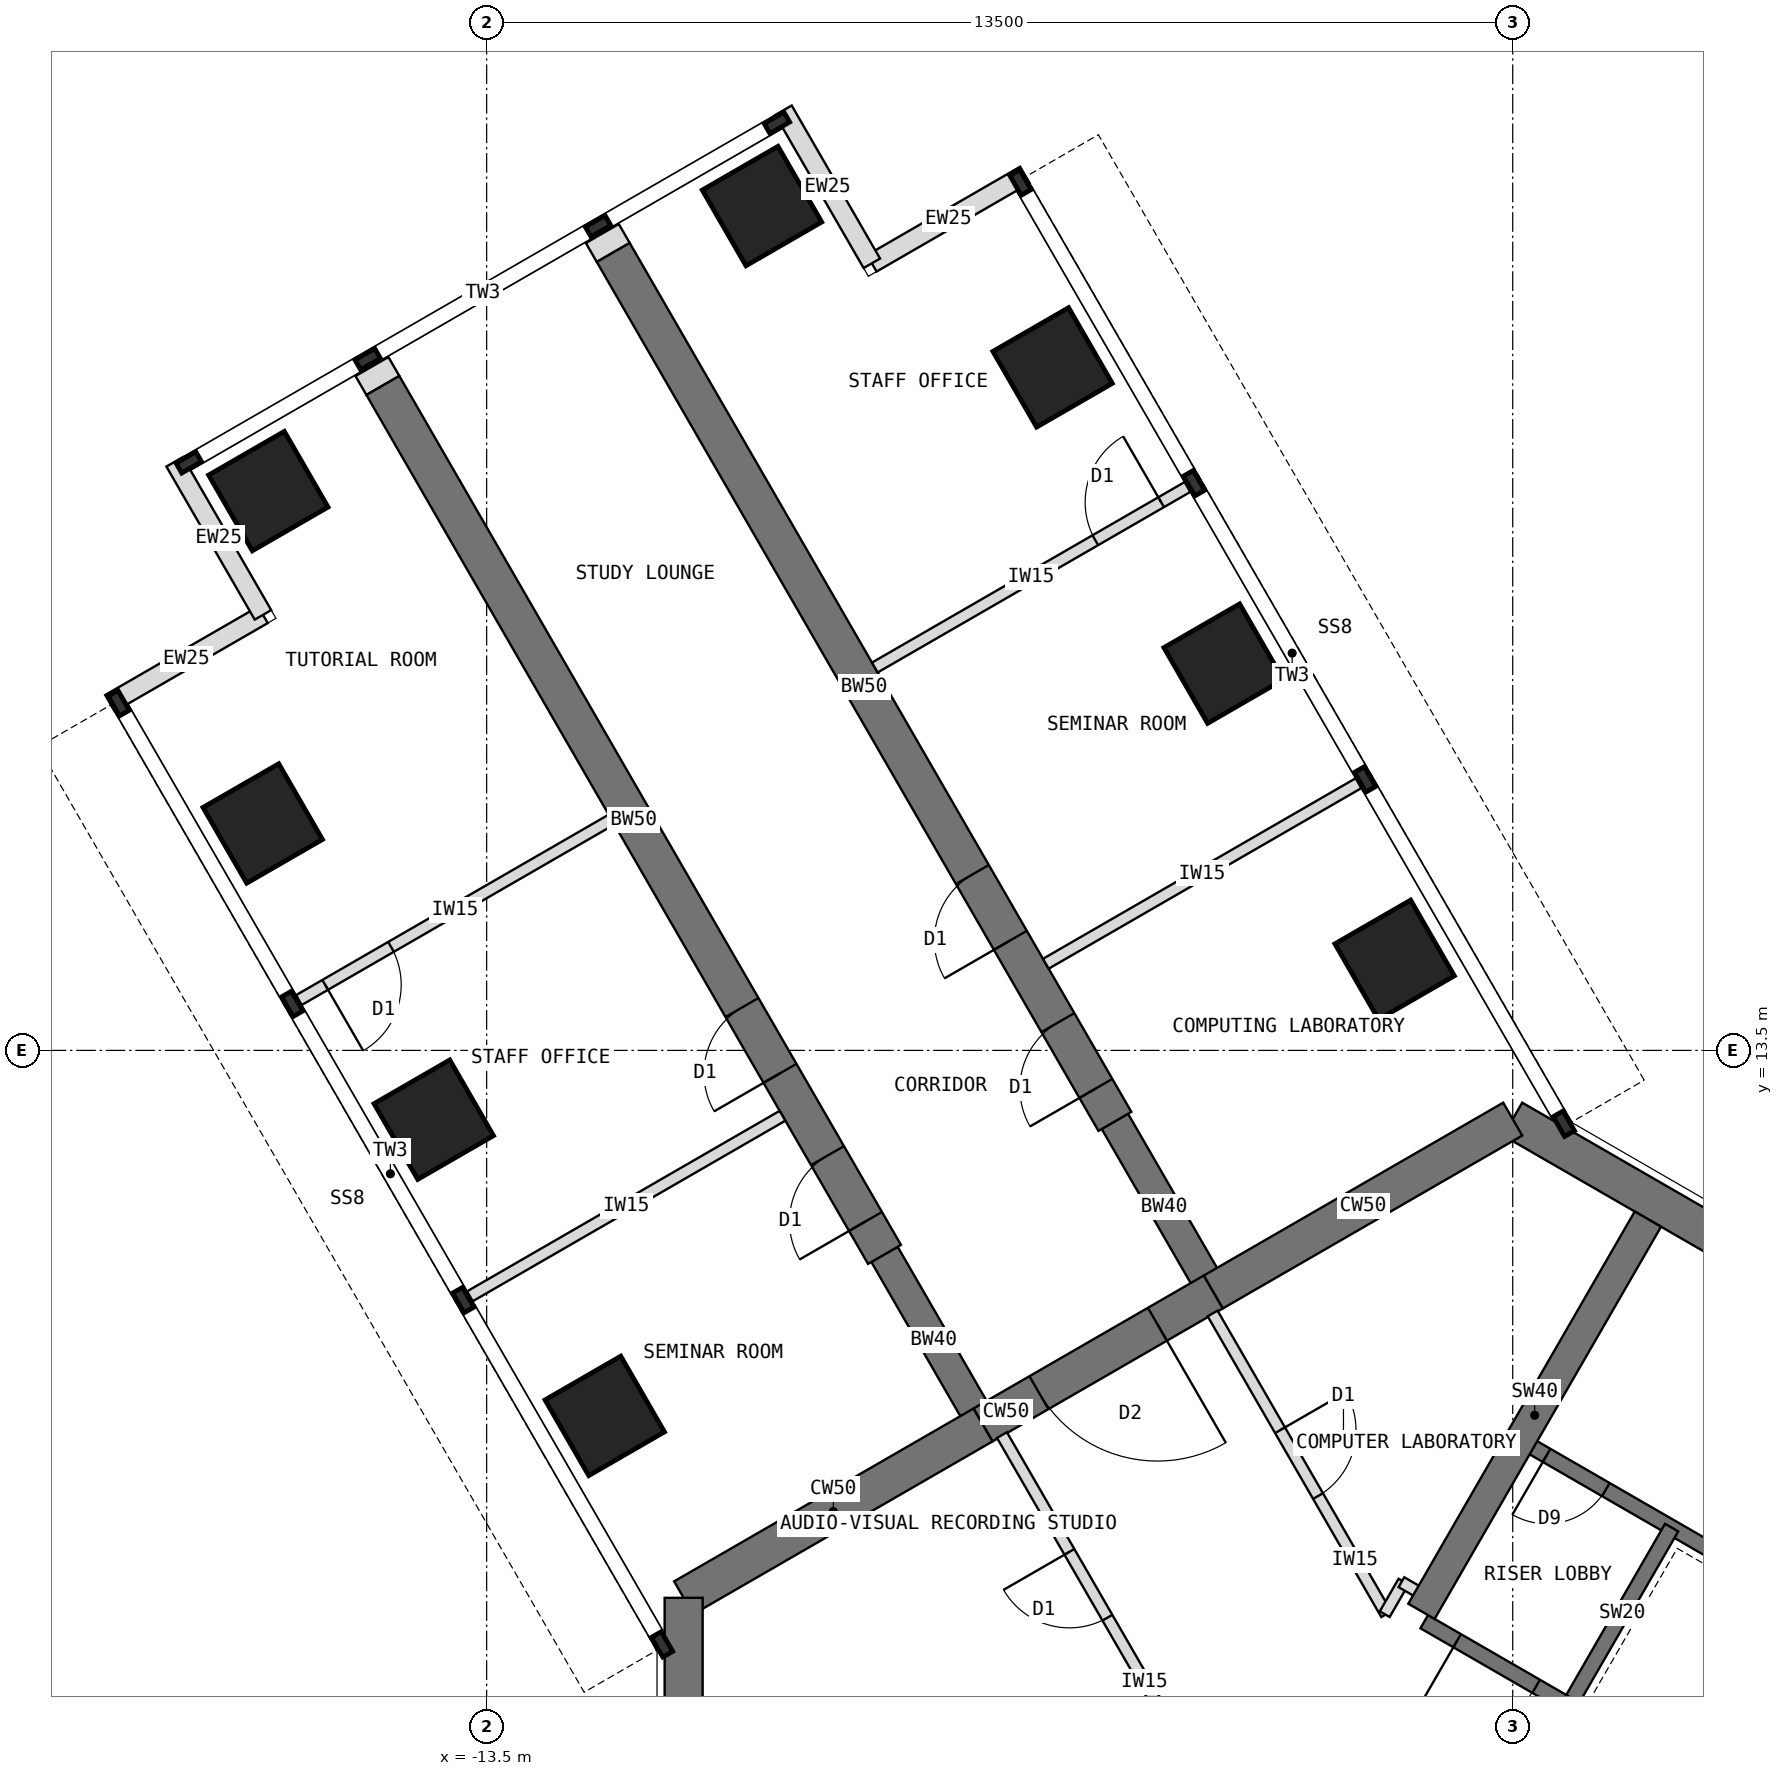
"""IFC4 building model, lengths in metres.
Left out: names, types, materials, properties, quantities, classifications, styles, units other than length and angle.
Written with IfcOpenShell. Run it as: python <this file> out.ifc"""

import sys

from ifc_helpers import new_model, si_unit, direction, frame, frame_2d, origin, origin_2d, place, context, subcontext, project, spatial, rectangle, extrude, element, fill, save


model = new_model("IFC4")
c1 = context("Model", 3, precision=1e-05, world=origin(), true_north=direction((0.0, 1.0)))
c2 = subcontext(c1, "Body", "Model", "MODEL_VIEW")
j1 = project(units=[si_unit("LENGTHUNIT", "METRE"), si_unit("PLANEANGLEUNIT", "RADIAN")], contexts=[c1])
p1 = place(None, origin())
s1 = spatial("IfcSite", under=j1, at=p1, CompositionType="ELEMENT")
p2 = place(p1, origin())
s2 = spatial("IfcBuilding", under=s1, at=p2, CompositionType="ELEMENT")
p3 = place(p2, frame((0.0, 0.0, 194.5)))
s3 = spatial("IfcBuildingStorey", under=s2, at=p3, CompositionType="ELEMENT", Elevation=194.5)
p4 = place(p3, frame((10.908, 6.298, 0.0), z_axis=(0.0, 0.0, 1.0), x_axis=(-0.866021940709, 0.500005998175, 0.0)))
e1 = element("IfcWall", 1, at=p4, inside=s3, PredefinedType="SHEAR", context=c2, shape_type="SweptSolid", body=[
    extrude(rectangle(XDim=12.596, YDim=0.5, at=frame_2d((6.298, 0.0))), origin(), (0.0, 0.0, 1.0), 4.0),
])
p5 = place(p3, frame((0.0, 12.596, 0.0), z_axis=(0.0, 0.0, 1.0), x_axis=(-0.866011268655, -0.500024481964, 0.0)))
e2 = element("IfcWall", 2, at=p5, inside=s3, PredefinedType="SHEAR", context=c2, shape_type="SweptSolid", body=[
    extrude(rectangle(XDim=4.548, YDim=0.5, at=frame_2d((2.274, 0.0))), origin(), (0.0, 0.0, 1.0), 4.0),
])
p6 = place(p3, frame((-3.939, 10.322, 0.0), z_axis=(0.0, 0.0, 1.0), x_axis=(-0.866019471182, -0.500010275428, 0.0)))
e3 = element("IfcWall", 3, at=p6, inside=s3, PredefinedType="SHEAR", context=c2, shape_type="SweptSolid", body=[
    extrude(rectangle(XDim=3.5, YDim=0.5, at=frame_2d((1.75, 0.0))), origin(), (0.0, 0.0, 1.0), 4.0),
])
p7 = place(p6, frame((0.85, 0.0, 0.0)))
e4 = element("IfcOpeningElement", 4, at=p7, cuts=e3, PredefinedType="OPENING", context=c2, shape_type="SweptSolid", body=[
    extrude(rectangle(XDim=1.8, YDim=2.1, at=frame_2d((0.9, 1.05))), frame((0.0, 0.26, 0.0), z_axis=(0.0, -1.0, 0.0), x_axis=(1.0, 0.0, 0.0)), (0.0, 0.0, 1.0), 0.52),
])
p8 = place(p3, frame((-6.97, 8.572, 0.0), z_axis=(0.0, 0.0, 1.0), x_axis=(-0.866034513004, -0.499984222037, 0.0)))
e5 = element("IfcWall", 5, at=p8, inside=s3, PredefinedType="SHEAR", context=c2, shape_type="SweptSolid", body=[
    extrude(rectangle(XDim=4.548, YDim=0.5, at=frame_2d((2.274, 0.0))), origin(), (0.0, 0.0, 1.0), 4.0),
])
p9 = place(p3, frame((-10.908, 6.298, 0.0), z_axis=(0.0, 0.0, 1.0), x_axis=(0.0, -1.0, 0.0)))
e6 = element("IfcWall", 6, at=p9, inside=s3, PredefinedType="SHEAR", context=c2, shape_type="SweptSolid", body=[
    extrude(rectangle(XDim=12.596, YDim=0.5, at=frame_2d((6.298, 0.0))), origin(), (0.0, 0.0, 1.0), 4.0),
])
p10 = place(p3, frame((-6.97, 8.572, 0.0), z_axis=(0.0, 0.0, 1.0), x_axis=(-0.499988811324, 0.866031863473, 0.0)))
e7 = element("IfcWall", 7, at=p10, inside=s3, PredefinedType="SHEAR", context=c2, shape_type="SweptSolid", body=[
    extrude(rectangle(XDim=2.592, YDim=0.4, at=frame_2d((1.296, 0.0))), origin(), (0.0, 0.0, 1.0), 4.0),
])
p11 = place(p3, frame((-8.266, 10.816, 0.0), z_axis=(0.0, 0.0, 1.0), x_axis=(-0.499996231654, 0.866027579429, 0.0)))
e8 = element("IfcWall", 8, at=p11, inside=s3, PredefinedType="SHEAR", context=c2, shape_type="SweptSolid", body=[
    extrude(rectangle(XDim=13.2, YDim=0.5, at=frame_2d((6.6, 0.0))), origin(), (0.0, 0.0, 1.0), 4.0),
])
p12 = place(p11, frame((0.5, 0.0, 0.0)))
e9 = element("IfcOpeningElement", 9, at=p12, cuts=e8, PredefinedType="OPENING", context=c2, shape_type="SweptSolid", body=[
    extrude(rectangle(XDim=1.0, YDim=2.1, at=frame_2d((0.5, 1.05))), frame((0.0, 0.26, 0.0), z_axis=(0.0, -1.0, 0.0), x_axis=(1.0, 0.0, 0.0)), (0.0, 0.0, 1.0), 0.52),
])
p13 = place(p11, frame((2.75, 0.0, 0.0)))
e10 = element("IfcOpeningElement", 10, at=p13, cuts=e8, PredefinedType="OPENING", context=c2, shape_type="SweptSolid", body=[
    extrude(rectangle(XDim=1.0, YDim=2.1, at=frame_2d((0.5, 1.05))), frame((0.0, 0.26, 0.0), z_axis=(0.0, -1.0, 0.0), x_axis=(1.0, 0.0, 0.0)), (0.0, 0.0, 1.0), 0.52),
])
p14 = place(p3, frame((-3.939, 10.322, 0.0), z_axis=(0.0, 0.0, 1.0), x_axis=(-0.499918158782, 0.866072649678, 0.0)))
e11 = element("IfcWall", 11, at=p14, inside=s3, PredefinedType="SHEAR", context=c2, shape_type="SweptSolid", body=[
    extrude(rectangle(XDim=2.592, YDim=0.4, at=frame_2d((1.296, 0.0))), origin(), (0.0, 0.0, 1.0), 4.0),
])
p15 = place(p3, frame((-5.234, 12.566, 0.0), z_axis=(0.0, 0.0, 1.0), x_axis=(-0.500010103361, 0.866019570528, 0.0)))
e12 = element("IfcWall", 12, at=p15, inside=s3, PredefinedType="SHEAR", context=c2, shape_type="SweptSolid", body=[
    extrude(rectangle(XDim=13.2, YDim=0.5, at=frame_2d((6.6, 0.0))), origin(), (0.0, 0.0, 1.0), 4.0),
])
p16 = place(p15, frame((0.5, 0.0, 0.0)))
e13 = element("IfcOpeningElement", 13, at=p16, cuts=e12, PredefinedType="OPENING", context=c2, shape_type="SweptSolid", body=[
    extrude(rectangle(XDim=1.0, YDim=2.1, at=frame_2d((0.5, 1.05))), frame((0.0, 0.26, 0.0), z_axis=(0.0, -1.0, 0.0), x_axis=(1.0, 0.0, 0.0)), (0.0, 0.0, 1.0), 0.52),
])
p17 = place(p15, frame((2.75, 0.0, 0.0)))
e14 = element("IfcOpeningElement", 14, at=p17, cuts=e12, PredefinedType="OPENING", context=c2, shape_type="SweptSolid", body=[
    extrude(rectangle(XDim=1.0, YDim=2.1, at=frame_2d((0.5, 1.05))), frame((0.0, 0.26, 0.0), z_axis=(0.0, -1.0, 0.0), x_axis=(1.0, 0.0, 0.0)), (0.0, 0.0, 1.0), 0.52),
])
for number, where, z_axis, x_axis in (
    (15, (-11.946, 8.691, 0.0), (0.0, 0.0, 1.0), (0.866, 0.5, 0.0)),
    (16, (-1.554, 14.691, 0.0), (0.0, 0.0, 1.0), (0.866, 0.5, 0.0)),
    (17, (-14.196, 12.588, 0.0), (0.0, 0.0, 1.0), (0.866, 0.5, 0.0)),
    (18, (-3.804, 18.588, 0.0), (0.0, 0.0, 1.0), (0.866, 0.5, 0.0)),
    (19, (-16.446, 16.486, 0.0), (0.0, 0.0, 1.0), (0.866, 0.5, 0.0)),
    (20, (-6.054, 22.486, 0.0), (0.0, 0.0, 1.0), (0.866, 0.5, 0.0)),
    (21, (-16.373, 20.858, 0.0), (0.0, 0.0, 1.0), (0.866, 0.5, 0.0)),
    (22, (-9.877, 24.608, 0.0), (0.0, 0.0, 1.0), (0.866, 0.5, 0.0)),
):
    element("IfcColumn", number, at=place(p3, frame(where, z_axis=z_axis, x_axis=x_axis)), inside=s3, PredefinedType="COLUMN", context=c2, shape_type="SweptSolid", body=[
        extrude(rectangle(XDim=1.15, YDim=1.15, at=origin_2d()), origin(), (0.0, 0.0, 1.0), 4.0),
    ])
for number, where, z_axis, x_axis in (
    (23, (-18.456, 18.067, 0.0), (0.0, 0.0, 1.0), (0.866, 0.5, 0.0)),
    (24, (-16.443, 19.23, 0.0), (0.0, 0.0, 1.0), (-0.5, 0.866, 0.0)),
    (25, (-6.419, 25.017, 0.0), (0.0, 0.0, 1.0), (-0.866, -0.5, 0.0)),
    (26, (-8.432, 23.855, 0.0), (0.0, 0.0, 1.0), (-0.5, 0.866, 0.0)),
):
    element("IfcWall", number, at=place(p3, frame(where, z_axis=z_axis, x_axis=x_axis)), inside=s3, PredefinedType="STANDARD", context=c2, shape_type="SweptSolid", body=[
        extrude(rectangle(XDim=2.325, YDim=0.25, at=frame_2d((1.163, 0.0))), origin(), (0.0, 0.0, 1.0), 3.8),
    ])
for number, where, z_axis, x_axis in (
    (27, (-14.865, 22.248, 0.0), (0.0, 0.0, 1.0), (-0.5, 0.866, 0.0)),
    (28, (-11.834, 23.998, 0.0), (0.0, 0.0, 1.0), (-0.5, 0.866, 0.0)),
):
    element("IfcWall", number, at=place(p3, frame(where, z_axis=z_axis, x_axis=x_axis)), inside=s3, PredefinedType="PARTITIONING", context=c2, shape_type="SweptSolid", body=[
        extrude(rectangle(XDim=0.288, YDim=0.5, at=frame_2d((0.144, 0.0))), origin(), (0.0, 0.0, 1.0), 3.8),
    ])
p18 = place(p3, frame((5.764, 1.984, 0.0), z_axis=(0.0, 0.0, 1.0), x_axis=(-0.866026010844, 0.49999894854, 0.0)))
e29 = element("IfcWall", 29, at=p18, inside=s3, PredefinedType="SHEAR", context=c2, shape_type="SweptSolid", body=[
    extrude(rectangle(XDim=8.0, YDim=0.2, at=frame_2d((4.0, 0.0))), origin(), (0.0, 0.0, 1.0), 4.0),
])
p19 = place(p18, frame((6.3, 0.0, 0.0)))
e30 = element("IfcOpeningElement", 30, at=p19, cuts=e29, PredefinedType="OPENING", context=c2, shape_type="SweptSolid", body=[
    extrude(rectangle(XDim=1.2, YDim=2.1, at=frame_2d((0.6, 1.05))), frame((0.0, 0.11, 0.0), z_axis=(0.0, -1.0, 0.0), x_axis=(1.0, 0.0, 0.0)), (0.0, 0.0, 1.0), 0.22),
])
p20 = place(p3, frame((0.791, 4.97, 0.0), z_axis=(0.0, 0.0, 1.0), x_axis=(0.499936506574, 0.866062058628, 0.0)))
e31 = element("IfcWall", 31, at=p20, inside=s3, PredefinedType="SHEAR", context=c2, shape_type="SweptSolid", body=[
    extrude(rectangle(XDim=2.6, YDim=0.2, at=frame_2d((1.3, 0.0))), origin(), (0.0, 0.0, 1.0), 4.0),
])
p21 = place(p3, frame((7.114, 4.322, 0.0), z_axis=(0.0, 0.0, 1.0), x_axis=(-0.866026010844, 0.49999894854, 0.0)))
e32 = element("IfcWall", 32, at=p21, inside=s3, PredefinedType="SHEAR", context=c2, shape_type="SweptSolid", body=[
    extrude(rectangle(XDim=8.0, YDim=0.2, at=frame_2d((4.0, 0.0))), origin(), (0.0, 0.0, 1.0), 4.0),
])
p22 = place(p21, frame((6.8, 0.0, 0.0)))
e33 = element("IfcOpeningElement", 33, at=p22, cuts=e32, PredefinedType="OPENING", context=c2, shape_type="SweptSolid", body=[
    extrude(rectangle(XDim=0.9, YDim=2.1, at=frame_2d((0.45, 1.05))), frame((0.0, 0.11, 0.0), z_axis=(0.0, -1.0, 0.0), x_axis=(1.0, 0.0, 0.0)), (0.0, 0.0, 1.0), 0.22),
])
p23 = place(p3, frame((-1.201, 6.12, 0.0), z_axis=(0.0, 0.0, 1.0), x_axis=(0.500021575205, 0.866012946976, 0.0)))
e34 = element("IfcWall", 34, at=p23, inside=s3, PredefinedType="SHEAR", context=c2, shape_type="SweptSolid", body=[
    extrude(rectangle(XDim=5.958, YDim=0.4, at=frame_2d((2.979, 0.0))), origin(), (0.0, 0.0, 1.0), 4.0),
])
p24 = place(p3, frame((-9.607, 12.64, 0.0), z_axis=(0.0, 0.0, 1.0), x_axis=(-0.866033238375, -0.499986429846, 0.0)))
e35 = element("IfcWall", 35, at=p24, inside=s3, PredefinedType="PARTITIONING", context=c2, shape_type="SweptSolid", body=[
    extrude(rectangle(XDim=4.75, YDim=0.15, at=frame_2d((2.375, 0.0))), origin(), (0.0, 0.0, 1.0), 3.8),
])
p25 = place(p3, frame((-11.857, 16.537, 0.0), z_axis=(0.0, 0.0, 1.0), x_axis=(-0.866033238375, -0.499986429846, 0.0)))
e36 = element("IfcWall", 36, at=p25, inside=s3, PredefinedType="PARTITIONING", context=c2, shape_type="SweptSolid", body=[
    extrude(rectangle(XDim=4.75, YDim=0.15, at=frame_2d((2.375, 0.0))), origin(), (0.0, 0.0, 1.0), 3.8),
])
p26 = place(p25, frame((3.35, 0.0, 0.0)))
e37 = element("IfcOpeningElement", 37, at=p26, cuts=e36, PredefinedType="OPENING", context=c2, shape_type="SweptSolid", body=[
    extrude(rectangle(XDim=1.0, YDim=2.1, at=frame_2d((0.5, 1.05))), frame((0.0, 0.085, 0.0), z_axis=(0.0, -1.0, 0.0), x_axis=(1.0, 0.0, 0.0)), (0.0, 0.0, 1.0), 0.17),
])
p27 = place(p3, frame((-6.143, 14.64, 0.0), z_axis=(0.0, 0.0, 1.0), x_axis=(0.866033238375, 0.499986429846, 0.0)))
e38 = element("IfcWall", 38, at=p27, inside=s3, PredefinedType="PARTITIONING", context=c2, shape_type="SweptSolid", body=[
    extrude(rectangle(XDim=4.75, YDim=0.15, at=frame_2d((2.375, 0.0))), origin(), (0.0, 0.0, 1.0), 3.8),
])
p28 = place(p3, frame((-8.393, 18.537, 0.0), z_axis=(0.0, 0.0, 1.0), x_axis=(0.866033238375, 0.499986429846, 0.0)))
e39 = element("IfcWall", 39, at=p28, inside=s3, PredefinedType="PARTITIONING", context=c2, shape_type="SweptSolid", body=[
    extrude(rectangle(XDim=4.75, YDim=0.15, at=frame_2d((2.375, 0.0))), origin(), (0.0, 0.0, 1.0), 3.8),
])
p29 = place(p28, frame((3.35, 0.0, 0.0)))
e40 = element("IfcOpeningElement", 40, at=p29, cuts=e39, PredefinedType="OPENING", context=c2, shape_type="SweptSolid", body=[
    extrude(rectangle(XDim=1.0, YDim=2.1, at=frame_2d((0.5, 1.05))), frame((0.0, 0.085, 0.0), z_axis=(0.0, -1.0, 0.0), x_axis=(1.0, 0.0, 0.0)), (0.0, 0.0, 1.0), 0.17),
])
p30 = place(p3, frame((-4.436, 4.483, 0.0), z_axis=(0.0, 0.0, 1.0), x_axis=(-0.500001558674, 0.866024503882, 0.0)))
e41 = element("IfcWall", 41, at=p30, inside=s3, PredefinedType="PARTITIONING", context=c2, shape_type="SweptSolid", body=[
    extrude(rectangle(XDim=4.568, YDim=0.15, at=frame_2d((2.284, 0.0))), origin(), (0.0, 0.0, 1.0), 3.8),
])
p31 = place(p30, frame((1.794, 0.0, 0.0)))
e42 = element("IfcOpeningElement", 42, at=p31, cuts=e41, PredefinedType="OPENING", context=c2, shape_type="SweptSolid", body=[
    extrude(rectangle(XDim=1.0, YDim=2.1, at=frame_2d((0.5, 1.05))), frame((0.0, 0.085, 0.0), z_axis=(0.0, -1.0, 0.0), x_axis=(1.0, 0.0, 0.0)), (0.0, 0.0, 1.0), 0.17),
])
p32 = place(p3, frame((-3.948, 10.039, 0.0), z_axis=(0.0, 0.0, 1.0), x_axis=(0.500001558674, -0.866024503882, 0.0)))
e43 = element("IfcWall", 43, at=p32, inside=s3, PredefinedType="PARTITIONING", context=c2, shape_type="SweptSolid", body=[
    extrude(rectangle(XDim=4.568, YDim=0.15, at=frame_2d((2.284, 0.0))), origin(), (0.0, 0.0, 1.0), 3.8),
])
p33 = place(p32, frame((1.774, 0.0, 0.0)))
e44 = element("IfcOpeningElement", 44, at=p33, cuts=e43, PredefinedType="OPENING", context=c2, shape_type="SweptSolid", body=[
    extrude(rectangle(XDim=1.0, YDim=2.1, at=frame_2d((0.5, 1.05))), frame((0.0, 0.085, 0.0), z_axis=(0.0, -1.0, 0.0), x_axis=(1.0, 0.0, 0.0)), (0.0, 0.0, 1.0), 0.17),
])
p34 = place(p3, frame((-1.684, 6.083, 0.0), z_axis=(0.0, 0.0, 1.0), x_axis=(0.50033519877, 0.865831790172, 0.0)))
e45 = element("IfcWall", 45, at=p34, inside=s3, PredefinedType="PARTITIONING", context=c2, shape_type="SweptSolid", body=[
    extrude(rectangle(XDim=0.494, YDim=0.15, at=frame_2d((0.247, 0.0))), origin(), (0.0, 0.0, 1.0), 3.8),
])
p35 = place(p3, frame((-1.464, 6.503, 0.0), z_axis=(0.0, 0.0, 1.0), x_axis=(0.866138304741, -0.499804398801, 0.0)))
e46 = element("IfcWall", 46, at=p35, inside=s3, PredefinedType="PARTITIONING", context=c2, shape_type="SweptSolid", body=[
    extrude(rectangle(XDim=0.43, YDim=0.15, at=frame_2d((0.215, 0.0))), origin(), (0.0, 0.0, 1.0), 3.8),
])
p36 = place(p19, origin())
e47 = element("IfcDoor", 47, at=p36, inside=s3, OperationType="SINGLE_SWING_RIGHT", PredefinedType="DOOR", context=c2, shape_type="SweptSolid", body=[
    extrude(rectangle(XDim=1.2, YDim=2.1, at=frame_2d((0.6, 1.05))), frame((0.0, 0.025, 0.0), z_axis=(0.0, -1.0, 0.0), x_axis=(1.0, 0.0, 0.0)), (0.0, 0.0, 1.0), 0.05),
])
fill(e30, e47)
p37 = place(p22, origin())
e48 = element("IfcDoor", 48, at=p37, inside=s3, OperationType="SINGLE_SWING_RIGHT", PredefinedType="DOOR", context=c2, shape_type="SweptSolid", body=[
    extrude(rectangle(XDim=0.9, YDim=2.1, at=frame_2d((0.45, 1.05))), frame((0.0, 0.025, 0.0), z_axis=(0.0, -1.0, 0.0), x_axis=(1.0, 0.0, 0.0)), (0.0, 0.0, 1.0), 0.05),
])
fill(e33, e48)
p38 = place(p7, origin())
e49 = element("IfcDoor", 49, at=p38, inside=s3, OperationType="DOUBLE_DOOR_DOUBLE_SWING", PredefinedType="DOOR", context=c2, shape_type="SweptSolid", body=[
    extrude(rectangle(XDim=1.8, YDim=2.1, at=frame_2d((0.9, 1.05))), frame((0.0, 0.025, 0.0), z_axis=(0.0, -1.0, 0.0), x_axis=(1.0, 0.0, 0.0)), (0.0, 0.0, 1.0), 0.05),
])
fill(e4, e49)
p39 = place(p26, origin())
e50 = element("IfcDoor", 50, at=p39, inside=s3, OperationType="SINGLE_SWING_RIGHT", PredefinedType="DOOR", context=c2, shape_type="SweptSolid", body=[
    extrude(rectangle(XDim=1.0, YDim=2.1, at=frame_2d((0.5, 1.05))), frame((0.0, 0.025, 0.0), z_axis=(0.0, -1.0, 0.0), x_axis=(1.0, 0.0, 0.0)), (0.0, 0.0, 1.0), 0.05),
])
fill(e37, e50)
p40 = place(p29, origin())
e51 = element("IfcDoor", 51, at=p40, inside=s3, OperationType="SINGLE_SWING_RIGHT", PredefinedType="DOOR", context=c2, shape_type="SweptSolid", body=[
    extrude(rectangle(XDim=1.0, YDim=2.1, at=frame_2d((0.5, 1.05))), frame((0.0, 0.025, 0.0), z_axis=(0.0, -1.0, 0.0), x_axis=(1.0, 0.0, 0.0)), (0.0, 0.0, 1.0), 0.05),
])
fill(e40, e51)
p41 = place(p33, origin())
e52 = element("IfcDoor", 52, at=p41, inside=s3, OperationType="SINGLE_SWING_LEFT", PredefinedType="DOOR", context=c2, shape_type="SweptSolid", body=[
    extrude(rectangle(XDim=1.0, YDim=2.1, at=frame_2d((0.5, 1.05))), frame((0.0, 0.025, 0.0), z_axis=(0.0, -1.0, 0.0), x_axis=(1.0, 0.0, 0.0)), (0.0, 0.0, 1.0), 0.05),
])
fill(e44, e52)
p42 = place(p31, origin())
e53 = element("IfcDoor", 53, at=p42, inside=s3, OperationType="SINGLE_SWING_RIGHT", PredefinedType="DOOR", context=c2, shape_type="SweptSolid", body=[
    extrude(rectangle(XDim=1.0, YDim=2.1, at=frame_2d((0.5, 1.05))), frame((0.0, 0.025, 0.0), z_axis=(0.0, -1.0, 0.0), x_axis=(1.0, 0.0, 0.0)), (0.0, 0.0, 1.0), 0.05),
])
fill(e42, e53)
p43 = place(p12, origin())
e54 = element("IfcDoor", 54, at=p43, inside=s3, OperationType="SINGLE_SWING_LEFT", PredefinedType="DOOR", context=c2, shape_type="SweptSolid", body=[
    extrude(rectangle(XDim=1.0, YDim=2.1, at=frame_2d((0.5, 1.05))), frame((0.0, 0.025, 0.0), z_axis=(0.0, -1.0, 0.0), x_axis=(1.0, 0.0, 0.0)), (0.0, 0.0, 1.0), 0.05),
])
fill(e9, e54)
p44 = place(p13, origin())
e55 = element("IfcDoor", 55, at=p44, inside=s3, OperationType="SINGLE_SWING_LEFT", PredefinedType="DOOR", context=c2, shape_type="SweptSolid", body=[
    extrude(rectangle(XDim=1.0, YDim=2.1, at=frame_2d((0.5, 1.05))), frame((0.0, 0.025, 0.0), z_axis=(0.0, -1.0, 0.0), x_axis=(1.0, 0.0, 0.0)), (0.0, 0.0, 1.0), 0.05),
])
fill(e10, e55)
p45 = place(p16, origin())
e56 = element("IfcDoor", 56, at=p45, inside=s3, OperationType="SINGLE_SWING_LEFT", PredefinedType="DOOR", context=c2, shape_type="SweptSolid", body=[
    extrude(rectangle(XDim=1.0, YDim=2.1, at=frame_2d((0.5, 1.05))), frame((0.0, 0.025, 0.0), z_axis=(0.0, -1.0, 0.0), x_axis=(1.0, 0.0, 0.0)), (0.0, 0.0, 1.0), 0.05),
])
fill(e13, e56)
p46 = place(p17, origin())
e57 = element("IfcDoor", 57, at=p46, inside=s3, OperationType="SINGLE_SWING_LEFT", PredefinedType="DOOR", context=c2, shape_type="SweptSolid", body=[
    extrude(rectangle(XDim=1.0, YDim=2.1, at=frame_2d((0.5, 1.05))), frame((0.0, 0.025, 0.0), z_axis=(0.0, -1.0, 0.0), x_axis=(1.0, 0.0, 0.0)), (0.0, 0.0, 1.0), 0.05),
])
fill(e14, e57)
save(model, sys.argv[1])
